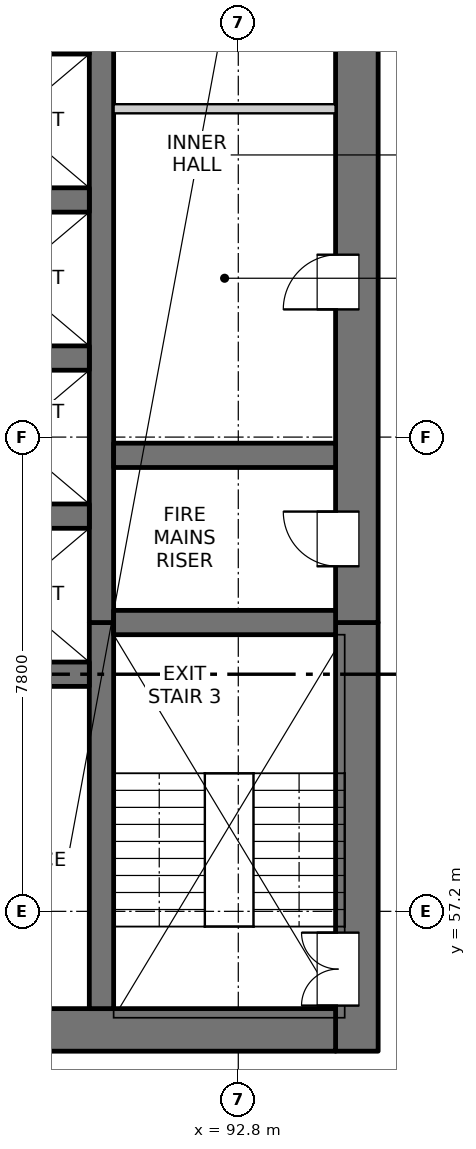
"""IFC4 building model, lengths in metres.
Left out: names, types, materials, properties, quantities, classifications, styles, units other than length and angle.
Written with IfcOpenShell. Run it as: python <this file> out.ifc"""

import sys

from ifc_helpers import new_model, si_unit, direction, frame, frame_2d, origin, place, context, subcontext, project, spatial, rectangle, extrude, element, fill, save


model = new_model("IFC4")
c1 = context("Model", 3, precision=1e-05, world=origin(), true_north=direction((0.0, 1.0)))
c2 = subcontext(c1, "Body", "Model", "MODEL_VIEW")
j1 = project(units=[si_unit("LENGTHUNIT", "METRE"), si_unit("PLANEANGLEUNIT", "RADIAN")], contexts=[c1])
p1 = place(None, origin())
s1 = spatial("IfcSite", under=j1, at=p1, CompositionType="ELEMENT")
p2 = place(p1, origin())
s2 = spatial("IfcBuilding", under=s1, at=p2, CompositionType="ELEMENT")
p3 = place(p2, frame((0.0, 0.0, 39.9)))
s3 = spatial("IfcBuildingStorey", under=s2, at=p3, CompositionType="ELEMENT", Elevation=39.9)
p4 = place(p3, frame((94.75, 54.9, -0.25), z_axis=(0.0, 0.0, 1.0), x_axis=(0.0, 1.0, 0.0)))
e1 = element("IfcWall", 1, at=p4, inside=s3, PredefinedType="SOLIDWALL", context=c2, shape_type="SweptSolid", body=[
    extrude(rectangle(XDim=7.05, YDim=0.7, at=frame_2d((3.525, 0.0))), origin(), (0.0, 0.0, 1.0), 3.4),
])
p5 = place(p4, frame((0.75, 0.0, 0.25)))
e2 = element("IfcOpeningElement", 2, at=p5, cuts=e1, PredefinedType="OPENING", context=c2, shape_type="SweptSolid", body=[
    extrude(rectangle(XDim=1.2, YDim=2.1, at=frame_2d((0.6, 1.05))), frame((0.0, 0.36, 0.0), z_axis=(0.0, -1.0, 0.0), x_axis=(1.0, 0.0, 0.0)), (0.0, 0.0, 1.0), 0.72),
])
p6 = place(p3, frame((94.75, 61.95, -0.25), z_axis=(0.0, 0.0, 1.0), x_axis=(0.0, 1.0, 0.0)))
e3 = element("IfcWall", 3, at=p6, inside=s3, PredefinedType="SOLIDWALL", context=c2, shape_type="SweptSolid", body=[
    extrude(rectangle(XDim=15.35, YDim=0.7, at=frame_2d((7.675, 0.0))), origin(), (0.0, 0.0, 1.0), 3.4),
])
p7 = place(p6, frame((0.925, 0.0, 0.25)))
e4 = element("IfcOpeningElement", 4, at=p7, cuts=e3, PredefinedType="OPENING", context=c2, shape_type="SweptSolid", body=[
    extrude(rectangle(XDim=0.9, YDim=2.1, at=frame_2d((0.45, 1.05))), frame((0.0, 0.36, 0.0), z_axis=(0.0, -1.0, 0.0), x_axis=(1.0, 0.0, 0.0)), (0.0, 0.0, 1.0), 0.72),
])
p8 = place(p6, frame((5.15, 0.0, 0.25)))
e5 = element("IfcOpeningElement", 5, at=p8, cuts=e3, PredefinedType="OPENING", context=c2, shape_type="SweptSolid", body=[
    extrude(rectangle(XDim=0.9, YDim=2.1, at=frame_2d((0.45, 1.05))), frame((0.0, 0.36, 0.0), z_axis=(0.0, -1.0, 0.0), x_axis=(1.0, 0.0, 0.0)), (0.0, 0.0, 1.0), 0.72),
])
p9 = place(p6, frame((9.65, 0.0, 0.25)))
e6 = element("IfcOpeningElement", 6, at=p9, cuts=e3, PredefinedType="OPENING", context=c2, shape_type="SweptSolid", body=[
    extrude(rectangle(XDim=0.9, YDim=2.1, at=frame_2d((0.45, 1.05))), frame((0.0, 0.36, 0.0), z_axis=(0.0, -1.0, 0.0), x_axis=(1.0, 0.0, 0.0)), (0.0, 0.0, 1.0), 0.72),
])
p10 = place(p6, frame((13.1, 0.0, 0.25)))
e7 = element("IfcOpeningElement", 7, at=p10, cuts=e3, PredefinedType="OPENING", context=c2, shape_type="SweptSolid", body=[
    extrude(rectangle(XDim=0.9, YDim=2.1, at=frame_2d((0.45, 1.05))), frame((0.0, 0.36, 0.0), z_axis=(0.0, -1.0, 0.0), x_axis=(1.0, 0.0, 0.0)), (0.0, 0.0, 1.0), 0.72),
])
p11 = place(p3, frame((75.6, 55.25, -0.25), z_axis=(0.0, 0.0, 1.0), x_axis=(1.0, 0.0, 0.0)))
e8 = element("IfcWall", 8, at=p11, inside=s3, PredefinedType="SOLIDWALL", context=c2, shape_type="SweptSolid", body=[
    extrude(rectangle(XDim=18.8, YDim=0.7, at=frame_2d((9.4, 0.0))), origin(), (0.0, 0.0, 1.0), 3.4),
])
p12 = place(p11, frame((8.65, 0.0, 0.25)))
e9 = element("IfcOpeningElement", 9, at=p12, cuts=e8, PredefinedType="OPENING", context=c2, shape_type="SweptSolid", body=[
    extrude(rectangle(XDim=1.5, YDim=2.1, at=frame_2d((0.75, 1.05))), frame((0.0, 0.36, 0.0), z_axis=(0.0, -1.0, 0.0), x_axis=(1.0, 0.0, 0.0)), (0.0, 0.0, 1.0), 0.72),
])
p13 = place(p3, frame((90.55, 55.6, -0.25), z_axis=(0.0, 0.0, 1.0), x_axis=(0.0, 1.0, 0.0)))
e10 = element("IfcWall", 10, at=p13, inside=s3, PredefinedType="SOLIDWALL", context=c2, shape_type="SweptSolid", body=[
    extrude(rectangle(XDim=6.35, YDim=0.4, at=frame_2d((3.175, 0.0))), origin(), (0.0, 0.0, 1.0), 3.4),
])
p14 = place(p3, frame((90.55, 61.95, -0.25), z_axis=(0.0, 0.0, 1.0), x_axis=(0.0, 1.0, 0.0)))
e11 = element("IfcWall", 11, at=p14, inside=s3, PredefinedType="SOLIDWALL", context=c2, shape_type="SweptSolid", body=[
    extrude(rectangle(XDim=15.35, YDim=0.4, at=frame_2d((7.675, 0.0))), origin(), (0.0, 0.0, 1.0), 3.4),
])
for number, where, z_axis, x_axis in (
    (12, (87.35, 61.1, -0.25), (0.0, 0.0, 1.0), (1.0, 0.0, 0.0)),
    (13, (87.35, 63.7, -0.25), (0.0, 0.0, 1.0), (1.0, 0.0, 0.0)),
    (14, (87.35, 66.3, -0.25), (0.0, 0.0, 1.0), (1.0, 0.0, 0.0)),
    (15, (87.35, 68.9, -0.25), (0.0, 0.0, 1.0), (1.0, 0.0, 0.0)),
    (16, (87.35, 71.5, -0.25), (0.0, 0.0, 1.0), (1.0, 0.0, 0.0)),
):
    element("IfcWall", number, at=place(p3, frame(where, z_axis=z_axis, x_axis=x_axis)), inside=s3, PredefinedType="SOLIDWALL", context=c2, shape_type="SweptSolid", body=[
        extrude(rectangle(XDim=3.0, YDim=0.4, at=frame_2d((1.5, 0.0))), origin(), (0.0, 0.0, 1.0), 3.4),
    ])
for number, where, z_axis, x_axis in (
    (17, (90.75, 61.95, -0.25), (0.0, 0.0, 1.0), (1.0, 0.0, 0.0)),
    (18, (90.75, 64.7, -0.25), (0.0, 0.0, 1.0), (1.0, 0.0, 0.0)),
):
    element("IfcWall", number, at=place(p3, frame(where, z_axis=z_axis, x_axis=x_axis)), inside=s3, PredefinedType="SOLIDWALL", context=c2, shape_type="SweptSolid", body=[
        extrude(rectangle(XDim=3.65, YDim=0.4, at=frame_2d((1.825, 0.0))), origin(), (0.0, 0.0, 1.0), 3.4),
    ])
p15 = place(p3, frame((90.75, 70.4, 0.0), z_axis=(0.0, 0.0, 1.0), x_axis=(1.0, 0.0, 0.0)))
e19 = element("IfcWall", 19, at=p15, inside=s3, PredefinedType="PARTITIONING", context=c2, shape_type="SweptSolid", body=[
    extrude(rectangle(XDim=3.65, YDim=0.15, at=frame_2d((1.825, 0.0))), origin(), (0.0, 0.0, 1.0), 3.15),
])
p16 = place(p5, origin())
e20 = element("IfcDoor", 20, at=p16, inside=s3, OperationType="DOUBLE_DOOR_SINGLE_SWING", PredefinedType="DOOR", context=c2, shape_type="SweptSolid", body=[
    extrude(rectangle(XDim=1.2, YDim=2.1, at=frame_2d((0.6, 1.05))), frame((0.0, 0.335, 0.0), z_axis=(0.0, -1.0, 0.0), x_axis=(1.0, 0.0, 0.0)), (0.0, 0.0, 1.0), 0.05),
])
fill(e2, e20)
p17 = place(p7, origin())
e21 = element("IfcDoor", 21, at=p17, inside=s3, OperationType="SINGLE_SWING_RIGHT", PredefinedType="DOOR", context=c2, shape_type="SweptSolid", body=[
    extrude(rectangle(XDim=0.9, YDim=2.1, at=frame_2d((0.45, 1.05))), frame((0.0, 0.335, 0.0), z_axis=(0.0, -1.0, 0.0), x_axis=(1.0, 0.0, 0.0)), (0.0, 0.0, 1.0), 0.05),
])
fill(e4, e21)
p18 = place(p8, origin())
e22 = element("IfcDoor", 22, at=p18, inside=s3, OperationType="SINGLE_SWING_LEFT", PredefinedType="DOOR", context=c2, shape_type="SweptSolid", body=[
    extrude(rectangle(XDim=0.9, YDim=2.1, at=frame_2d((0.45, 1.05))), frame((0.0, 0.335, 0.0), z_axis=(0.0, -1.0, 0.0), x_axis=(1.0, 0.0, 0.0)), (0.0, 0.0, 1.0), 0.05),
])
fill(e5, e22)
save(model, sys.argv[1])
